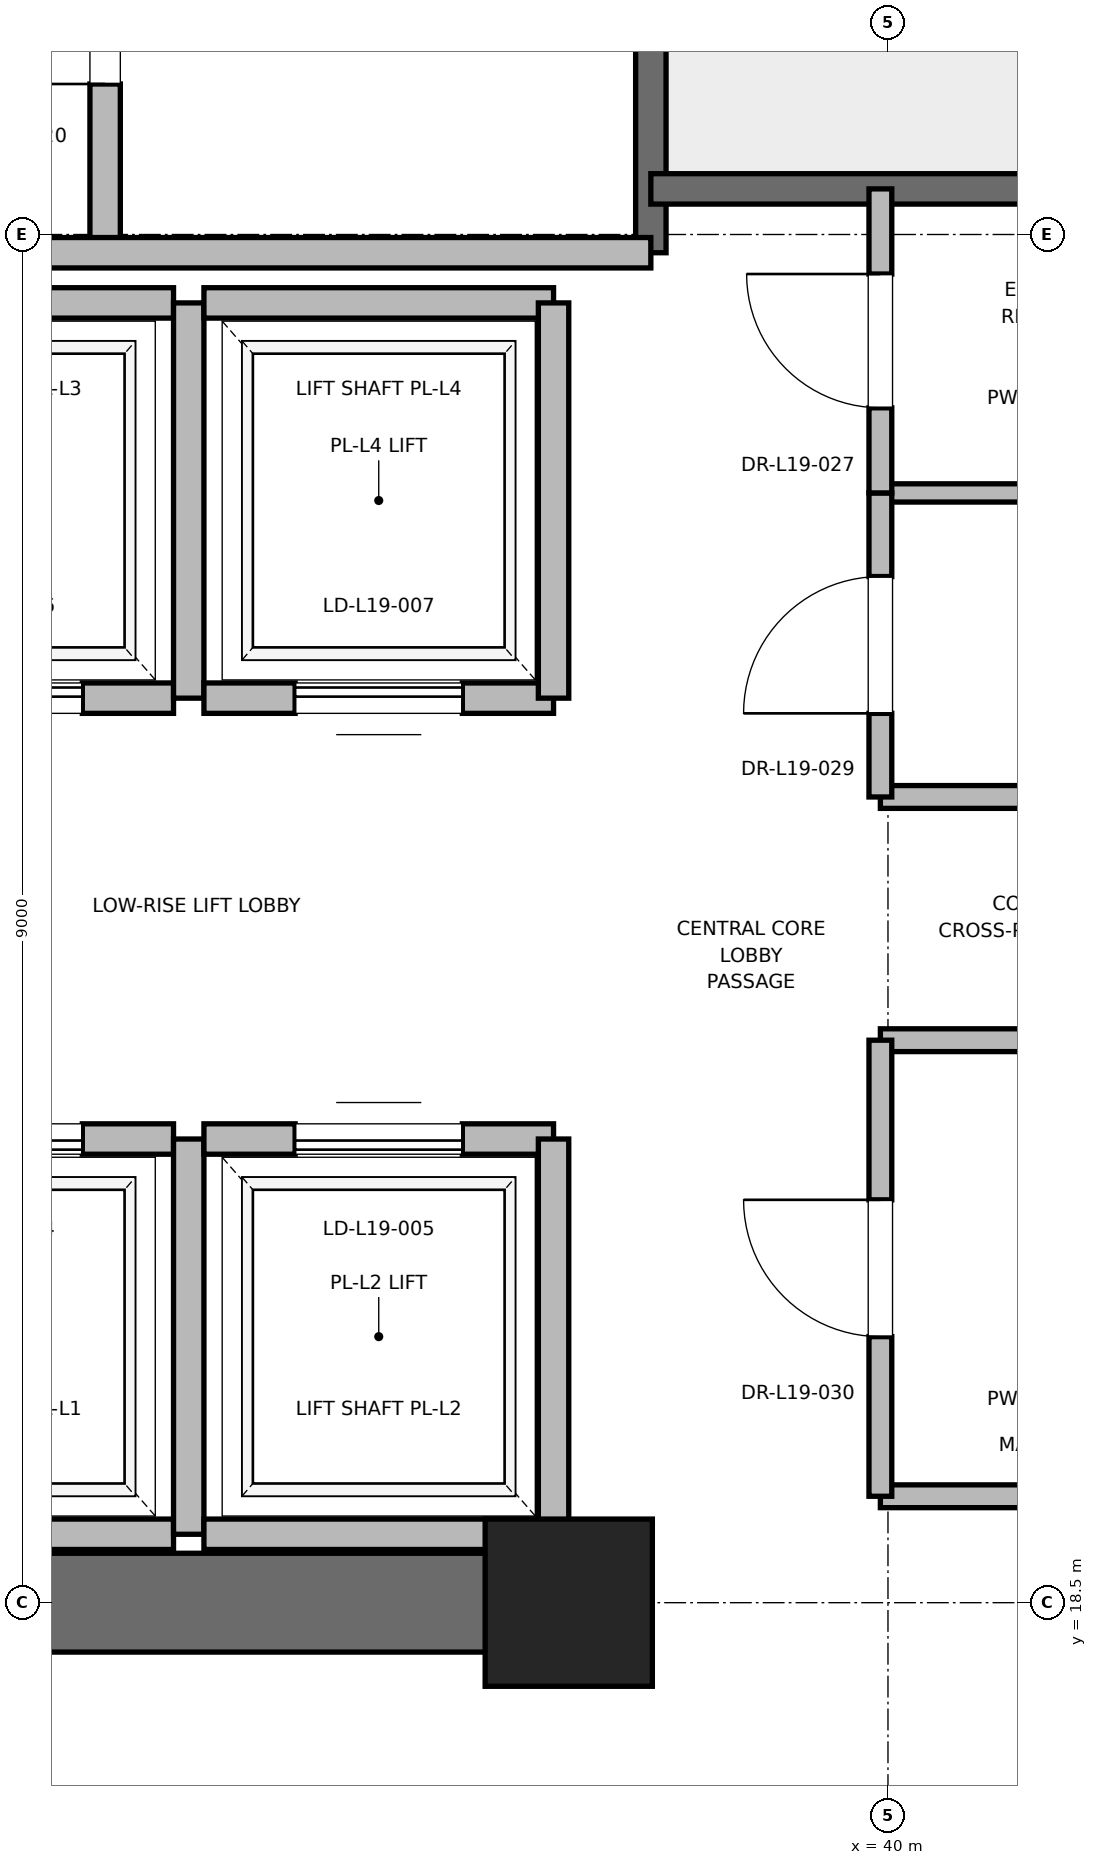
"""IFC4 building model, lengths in metres.
Left out: names, types, materials, properties, quantities, classifications, styles, units other than length and angle.
Written with IfcOpenShell. Run it as: python <this file> out.ifc"""

import sys

from ifc_helpers import new_model, si_unit, direction, frame, frame_2d, origin, origin_2d, place, context, subcontext, project, spatial, rectangle, extrude, element, fill, save


model = new_model("IFC4")
c1 = context("Model", 3, precision=1e-05, world=origin(), true_north=direction((0.0, 1.0)))
c2 = subcontext(c1, "Body", "Model", "MODEL_VIEW")
j1 = project(units=[si_unit("LENGTHUNIT", "METRE"), si_unit("PLANEANGLEUNIT", "RADIAN")], contexts=[c1])
p1 = place(None, origin())
s1 = spatial("IfcSite", under=j1, at=p1, CompositionType="ELEMENT")
p2 = place(p1, origin())
s2 = spatial("IfcBuilding", under=s1, at=p2, CompositionType="ELEMENT")
p3 = place(p2, frame((0.0, 0.0, 83.6)))
s3 = spatial("IfcBuildingStorey", under=s2, at=p3, CompositionType="ELEMENT", Elevation=83.6)
p4 = place(p3, frame((37.9, 18.5, 0.0), z_axis=(0.0, 0.0, 1.0), x_axis=(1.0, 0.0, 0.0)))
e1 = element("IfcColumn", 1, at=p4, inside=s3, PredefinedType="PILASTER", context=c2, shape_type="SweptSolid", body=[
    extrude(rectangle(XDim=1.1, YDim=1.1, at=origin_2d()), origin(), (0.0, 0.0, 1.0), 4.0),
])
p5 = place(p3, frame((29.0, 18.5, 0.0), z_axis=(0.0, 0.0, 1.0), x_axis=(1.0, 0.0, 0.0)))
e2 = element("IfcWall", 2, at=p5, inside=s3, PredefinedType="SHEAR", context=c2, shape_type="SweptSolid", body=[
    extrude(rectangle(XDim=9.2, YDim=0.65, at=frame_2d((4.6, 0.0))), origin(), (0.0, 0.0, 1.0), 3.76),
])
p6 = place(p3, frame((38.44, 27.38, 0.0), z_axis=(0.0, 0.0, 1.0), x_axis=(0.0, 1.0, 0.0)))
e3 = element("IfcWall", 3, at=p6, inside=s3, PredefinedType="SOLIDWALL", context=c2, shape_type="SweptSolid", body=[
    extrude(rectangle(XDim=8.87, YDim=0.2, at=frame_2d((4.435, 0.0))), origin(), (0.0, 0.0, 1.0), 3.76),
])
p7 = place(p3, frame((38.44, 27.8, 0.0), z_axis=(0.0, 0.0, 1.0), x_axis=(1.0, 0.0, 0.0)))
e4 = element("IfcWall", 4, at=p7, inside=s3, PredefinedType="SOLIDWALL", context=c2, shape_type="SweptSolid", body=[
    extrude(rectangle(XDim=3.32, YDim=0.2, at=frame_2d((1.66, 0.0))), origin(), (0.0, 0.0, 1.0), 3.76),
])
p8 = place(p3, frame((34.85, 27.38, 0.0), z_axis=(0.0, 0.0, 1.0), x_axis=(0.0, 1.0, 0.0)))
e5 = element("IfcWall", 5, at=p8, inside=s3, PredefinedType="PARTITIONING", context=c2, shape_type="SweptSolid", body=[
    extrude(rectangle(XDim=3.37, YDim=0.2, at=frame_2d((1.685, 0.0))), origin(), (0.0, 0.0, 1.0), 3.76),
])
p9 = place(p8, frame((1.11, 0.0, 0.0)))
e6 = element("IfcOpeningElement", 6, at=p9, cuts=e5, PredefinedType="OPENING", context=c2, shape_type="SweptSolid", body=[
    extrude(rectangle(XDim=1.15, YDim=2.2, at=frame_2d((0.575, 1.1))), frame((0.0, 0.1, 0.0), z_axis=(0.0, -1.0, 0.0), x_axis=(1.0, 0.0, 0.0)), (0.0, 0.0, 1.0), 0.2),
])
p10 = place(p3, frame((32.82, 27.38, 0.0), z_axis=(0.0, 0.0, 1.0), x_axis=(1.0, 0.0, 0.0)))
e7 = element("IfcWall", 7, at=p10, inside=s3, PredefinedType="PARTITIONING", context=c2, shape_type="SweptSolid", body=[
    extrude(rectangle(XDim=5.62, YDim=0.2, at=frame_2d((2.81, 0.0))), origin(), (0.0, 0.0, 1.0), 3.76),
])
p11 = place(p3, frame((33.0, 18.95, 0.0), z_axis=(0.0, 0.0, 1.0), x_axis=(1.0, 0.0, 0.0)))
e8 = element("IfcWall", 8, at=p11, inside=s3, PredefinedType="SOLIDWALL", context=c2, shape_type="SweptSolid", body=[
    extrude(rectangle(XDim=2.3, YDim=0.2, at=frame_2d((1.15, 0.0))), origin(), (0.0, 0.0, 1.0), 3.76),
])
p12 = place(p3, frame((35.3, 21.55, 0.0), z_axis=(0.0, 0.0, 1.0), x_axis=(-1.0, 0.0, 0.0)))
e9 = element("IfcWall", 9, at=p12, inside=s3, PredefinedType="SOLIDWALL", context=c2, shape_type="SweptSolid", body=[
    extrude(rectangle(XDim=2.3, YDim=0.2, at=frame_2d((1.15, 0.0))), origin(), (0.0, 0.0, 1.0), 3.76),
])
p13 = place(p12, frame((0.6, 0.0, 0.0)))
e10 = element("IfcOpeningElement", 10, at=p13, cuts=e9, PredefinedType="OPENING", context=c2, shape_type="SweptSolid", body=[
    extrude(rectangle(XDim=1.1, YDim=2.2, at=frame_2d((0.55, 1.1))), frame((0.0, 0.1, 0.0), z_axis=(0.0, -1.0, 0.0), x_axis=(1.0, 0.0, 0.0)), (0.0, 0.0, 1.0), 0.2),
])
p14 = place(p3, frame((35.4, 18.95, 0.0), z_axis=(0.0, 0.0, 1.0), x_axis=(0.0, 1.0, 0.0)))
e11 = element("IfcWall", 11, at=p14, inside=s3, PredefinedType="SOLIDWALL", context=c2, shape_type="SweptSolid", body=[
    extrude(rectangle(XDim=2.6, YDim=0.2, at=frame_2d((1.3, 0.0))), origin(), (0.0, 0.0, 1.0), 3.76),
])
p15 = place(p3, frame((35.5, 18.95, 0.0), z_axis=(0.0, 0.0, 1.0), x_axis=(1.0, 0.0, 0.0)))
e12 = element("IfcWall", 12, at=p15, inside=s3, PredefinedType="SOLIDWALL", context=c2, shape_type="SweptSolid", body=[
    extrude(rectangle(XDim=2.3, YDim=0.2, at=frame_2d((1.15, 0.0))), origin(), (0.0, 0.0, 1.0), 2.54),
])
p16 = place(p3, frame((37.8, 21.55, 0.0), z_axis=(0.0, 0.0, 1.0), x_axis=(-1.0, 0.0, 0.0)))
e13 = element("IfcWall", 13, at=p16, inside=s3, PredefinedType="SOLIDWALL", context=c2, shape_type="SweptSolid", body=[
    extrude(rectangle(XDim=2.3, YDim=0.2, at=frame_2d((1.15, 0.0))), origin(), (0.0, 0.0, 1.0), 3.76),
])
p17 = place(p16, frame((0.6, 0.0, 0.0)))
e14 = element("IfcOpeningElement", 14, at=p17, cuts=e13, PredefinedType="OPENING", context=c2, shape_type="SweptSolid", body=[
    extrude(rectangle(XDim=1.1, YDim=2.2, at=frame_2d((0.55, 1.1))), frame((0.0, 0.1, 0.0), z_axis=(0.0, -1.0, 0.0), x_axis=(1.0, 0.0, 0.0)), (0.0, 0.0, 1.0), 0.2),
])
p18 = place(p3, frame((37.8, 18.95, 0.0), z_axis=(0.0, 0.0, 1.0), x_axis=(0.0, 1.0, 0.0)))
e15 = element("IfcWall", 15, at=p18, inside=s3, PredefinedType="SOLIDWALL", context=c2, shape_type="SweptSolid", body=[
    extrude(rectangle(XDim=2.6, YDim=0.2, at=frame_2d((1.3, 0.0))), origin(), (0.0, 0.0, 1.0), 2.54),
])
p19 = place(p3, frame((33.0, 24.45, 0.0), z_axis=(0.0, 0.0, 1.0), x_axis=(1.0, 0.0, 0.0)))
e16 = element("IfcWall", 16, at=p19, inside=s3, PredefinedType="SOLIDWALL", context=c2, shape_type="SweptSolid", body=[
    extrude(rectangle(XDim=2.3, YDim=0.2, at=frame_2d((1.15, 0.0))), origin(), (0.0, 0.0, 1.0), 3.76),
])
p20 = place(p19, frame((0.6, 0.0, 0.0)))
e17 = element("IfcOpeningElement", 17, at=p20, cuts=e16, PredefinedType="OPENING", context=c2, shape_type="SweptSolid", body=[
    extrude(rectangle(XDim=1.1, YDim=2.2, at=frame_2d((0.55, 1.1))), frame((0.0, 0.1, 0.0), z_axis=(0.0, -1.0, 0.0), x_axis=(1.0, 0.0, 0.0)), (0.0, 0.0, 1.0), 0.2),
])
p21 = place(p3, frame((35.3, 27.05, 0.0), z_axis=(0.0, 0.0, 1.0), x_axis=(-1.0, 0.0, 0.0)))
e18 = element("IfcWall", 18, at=p21, inside=s3, PredefinedType="SOLIDWALL", context=c2, shape_type="SweptSolid", body=[
    extrude(rectangle(XDim=2.3, YDim=0.2, at=frame_2d((1.15, 0.0))), origin(), (0.0, 0.0, 1.0), 3.76),
])
p22 = place(p3, frame((35.4, 24.45, 0.0), z_axis=(0.0, 0.0, 1.0), x_axis=(0.0, 1.0, 0.0)))
e19 = element("IfcWall", 19, at=p22, inside=s3, PredefinedType="SOLIDWALL", context=c2, shape_type="SweptSolid", body=[
    extrude(rectangle(XDim=2.6, YDim=0.2, at=frame_2d((1.3, 0.0))), origin(), (0.0, 0.0, 1.0), 3.76),
])
p23 = place(p3, frame((35.5, 24.45, 0.0), z_axis=(0.0, 0.0, 1.0), x_axis=(1.0, 0.0, 0.0)))
e20 = element("IfcWall", 20, at=p23, inside=s3, PredefinedType="SOLIDWALL", context=c2, shape_type="SweptSolid", body=[
    extrude(rectangle(XDim=2.3, YDim=0.2, at=frame_2d((1.15, 0.0))), origin(), (0.0, 0.0, 1.0), 3.76),
])
p24 = place(p23, frame((0.6, 0.0, 0.0)))
e21 = element("IfcOpeningElement", 21, at=p24, cuts=e20, PredefinedType="OPENING", context=c2, shape_type="SweptSolid", body=[
    extrude(rectangle(XDim=1.1, YDim=2.2, at=frame_2d((0.55, 1.1))), frame((0.0, 0.1, 0.0), z_axis=(0.0, -1.0, 0.0), x_axis=(1.0, 0.0, 0.0)), (0.0, 0.0, 1.0), 0.2),
])
p25 = place(p3, frame((37.8, 27.05, 0.0), z_axis=(0.0, 0.0, 1.0), x_axis=(-1.0, 0.0, 0.0)))
e22 = element("IfcWall", 22, at=p25, inside=s3, PredefinedType="SOLIDWALL", context=c2, shape_type="SweptSolid", body=[
    extrude(rectangle(XDim=2.3, YDim=0.2, at=frame_2d((1.15, 0.0))), origin(), (0.0, 0.0, 1.0), 3.76),
])
p26 = place(p3, frame((37.8, 24.45, 0.0), z_axis=(0.0, 0.0, 1.0), x_axis=(0.0, 1.0, 0.0)))
e23 = element("IfcWall", 23, at=p26, inside=s3, PredefinedType="SOLIDWALL", context=c2, shape_type="SweptSolid", body=[
    extrude(rectangle(XDim=2.6, YDim=0.2, at=frame_2d((1.3, 0.0))), origin(), (0.0, 0.0, 1.0), 3.76),
])
for number, where, z_axis, x_axis in (
    (24, (39.95, 19.2, 0.0), (0.0, 0.0, 1.0), (1.0, 0.0, 0.0)),
    (25, (39.95, 22.2, 0.0), (0.0, 0.0, 1.0), (1.0, 0.0, 0.0)),
    (26, (39.95, 23.8, 0.0), (0.0, 0.0, 1.0), (1.0, 0.0, 0.0)),
):
    element("IfcWall", number, at=place(p3, frame(where, z_axis=z_axis, x_axis=x_axis)), inside=s3, PredefinedType="PARTITIONING", context=c2, shape_type="SweptSolid", body=[
        extrude(rectangle(XDim=1.81, YDim=0.15, at=frame_2d((0.905, 0.0))), origin(), (0.0, 0.0, 1.0), 2.85),
    ])
p27 = place(p3, frame((39.95, 25.8, 0.0), z_axis=(0.0, 0.0, 1.0), x_axis=(1.0, 0.0, 0.0)))
e27 = element("IfcWall", 27, at=p27, inside=s3, PredefinedType="PARTITIONING", context=c2, shape_type="SweptSolid", body=[
    extrude(rectangle(XDim=1.81, YDim=0.12, at=frame_2d((0.905, 0.0))), origin(), (0.0, 0.0, 1.0), 2.85),
])
p28 = place(p3, frame((39.95, 19.2, 0.0), z_axis=(0.0, 0.0, 1.0), x_axis=(0.0, 1.0, 0.0)))
e28 = element("IfcWall", 28, at=p28, inside=s3, PredefinedType="PARTITIONING", context=c2, shape_type="SweptSolid", body=[
    extrude(rectangle(XDim=3.0, YDim=0.15, at=frame_2d((1.5, 0.0))), origin(), (0.0, 0.0, 1.0), 2.85),
])
p29 = place(p28, frame((1.05, 0.0, 0.0)))
e29 = element("IfcOpeningElement", 29, at=p29, cuts=e28, PredefinedType="OPENING", context=c2, shape_type="SweptSolid", body=[
    extrude(rectangle(XDim=0.9, YDim=2.1, at=frame_2d((0.45, 1.05))), frame((0.0, 0.075, 0.0), z_axis=(0.0, -1.0, 0.0), x_axis=(1.0, 0.0, 0.0)), (0.0, 0.0, 1.0), 0.15),
])
p30 = place(p3, frame((39.95, 23.8, 0.0), z_axis=(0.0, 0.0, 1.0), x_axis=(0.0, 1.0, 0.0)))
e30 = element("IfcWall", 30, at=p30, inside=s3, PredefinedType="PARTITIONING", context=c2, shape_type="SweptSolid", body=[
    extrude(rectangle(XDim=2.0, YDim=0.15, at=frame_2d((1.0, 0.0))), origin(), (0.0, 0.0, 1.0), 2.85),
])
p31 = place(p30, frame((0.55, 0.0, 0.0)))
e31 = element("IfcOpeningElement", 31, at=p31, cuts=e30, PredefinedType="OPENING", context=c2, shape_type="SweptSolid", body=[
    extrude(rectangle(XDim=0.9, YDim=2.1, at=frame_2d((0.45, 1.05))), frame((0.0, 0.075, 0.0), z_axis=(0.0, -1.0, 0.0), x_axis=(1.0, 0.0, 0.0)), (0.0, 0.0, 1.0), 0.15),
])
p32 = place(p3, frame((39.95, 25.8, 0.0), z_axis=(0.0, 0.0, 1.0), x_axis=(0.0, 1.0, 0.0)))
e32 = element("IfcWall", 32, at=p32, inside=s3, PredefinedType="PARTITIONING", context=c2, shape_type="SweptSolid", body=[
    extrude(rectangle(XDim=2.0, YDim=0.15, at=frame_2d((1.0, 0.0))), origin(), (0.0, 0.0, 1.0), 2.85),
])
p33 = place(p32, frame((0.56, 0.0, 0.0)))
e33 = element("IfcOpeningElement", 33, at=p33, cuts=e32, PredefinedType="OPENING", context=c2, shape_type="SweptSolid", body=[
    extrude(rectangle(XDim=0.88, YDim=2.1, at=frame_2d((0.44, 1.05))), frame((0.0, 0.075, 0.0), z_axis=(0.0, -1.0, 0.0), x_axis=(1.0, 0.0, 0.0)), (0.0, 0.0, 1.0), 0.15),
])
p34 = place(p9, origin())
e34 = element("IfcDoor", 34, at=p34, inside=s3, OperationType="SINGLE_SWING_LEFT", PredefinedType="DOOR", context=c2, shape_type="SweptSolid", body=[
    extrude(rectangle(XDim=1.15, YDim=2.2, at=frame_2d((0.575, 1.1))), frame((0.0, 0.025, 0.0), z_axis=(0.0, -1.0, 0.0), x_axis=(1.0, 0.0, 0.0)), (0.0, 0.0, 1.0), 0.05),
])
fill(e6, e34)
p35 = place(p13, origin())
e35 = element("IfcDoor", 35, at=p35, inside=s3, OperationType="SLIDING_TO_RIGHT", PredefinedType="DOOR", context=c2, shape_type="SweptSolid", body=[
    extrude(rectangle(XDim=1.1, YDim=2.2, at=frame_2d((0.55, 1.1))), frame((0.0, 0.025, 0.0), z_axis=(0.0, -1.0, 0.0), x_axis=(1.0, 0.0, 0.0)), (0.0, 0.0, 1.0), 0.05),
])
fill(e10, e35)
p36 = place(p17, origin())
e36 = element("IfcDoor", 36, at=p36, inside=s3, OperationType="SLIDING_TO_RIGHT", PredefinedType="DOOR", context=c2, shape_type="SweptSolid", body=[
    extrude(rectangle(XDim=1.1, YDim=2.2, at=frame_2d((0.55, 1.1))), frame((0.0, 0.025, 0.0), z_axis=(0.0, -1.0, 0.0), x_axis=(1.0, 0.0, 0.0)), (0.0, 0.0, 1.0), 0.05),
])
fill(e14, e36)
p37 = place(p20, origin())
e37 = element("IfcDoor", 37, at=p37, inside=s3, OperationType="SLIDING_TO_RIGHT", PredefinedType="DOOR", context=c2, shape_type="SweptSolid", body=[
    extrude(rectangle(XDim=1.1, YDim=2.2, at=frame_2d((0.55, 1.1))), frame((0.0, 0.025, 0.0), z_axis=(0.0, -1.0, 0.0), x_axis=(1.0, 0.0, 0.0)), (0.0, 0.0, 1.0), 0.05),
])
fill(e17, e37)
p38 = place(p24, origin())
e38 = element("IfcDoor", 38, at=p38, inside=s3, OperationType="SLIDING_TO_RIGHT", PredefinedType="DOOR", context=c2, shape_type="SweptSolid", body=[
    extrude(rectangle(XDim=1.1, YDim=2.2, at=frame_2d((0.55, 1.1))), frame((0.0, 0.025, 0.0), z_axis=(0.0, -1.0, 0.0), x_axis=(1.0, 0.0, 0.0)), (0.0, 0.0, 1.0), 0.05),
])
fill(e21, e38)
p39 = place(p29, origin())
e39 = element("IfcDoor", 39, at=p39, inside=s3, OperationType="SINGLE_SWING_RIGHT", PredefinedType="DOOR", context=c2, shape_type="SweptSolid", body=[
    extrude(rectangle(XDim=0.9, YDim=2.1, at=frame_2d((0.45, 1.05))), frame((0.0, 0.025, 0.0), z_axis=(0.0, -1.0, 0.0), x_axis=(1.0, 0.0, 0.0)), (0.0, 0.0, 1.0), 0.05),
])
fill(e29, e39)
p40 = place(p31, origin())
e40 = element("IfcDoor", 40, at=p40, inside=s3, OperationType="SINGLE_SWING_LEFT", PredefinedType="DOOR", context=c2, shape_type="SweptSolid", body=[
    extrude(rectangle(XDim=0.9, YDim=2.1, at=frame_2d((0.45, 1.05))), frame((0.0, 0.025, 0.0), z_axis=(0.0, -1.0, 0.0), x_axis=(1.0, 0.0, 0.0)), (0.0, 0.0, 1.0), 0.05),
])
fill(e31, e40)
p41 = place(p33, origin())
e41 = element("IfcDoor", 41, at=p41, inside=s3, OperationType="SINGLE_SWING_RIGHT", PredefinedType="DOOR", context=c2, shape_type="SweptSolid", body=[
    extrude(rectangle(XDim=0.88, YDim=2.1, at=frame_2d((0.44, 1.05))), frame((0.0, 0.025, 0.0), z_axis=(0.0, -1.0, 0.0), x_axis=(1.0, 0.0, 0.0)), (0.0, 0.0, 1.0), 0.05),
])
fill(e33, e41)
save(model, sys.argv[1])
